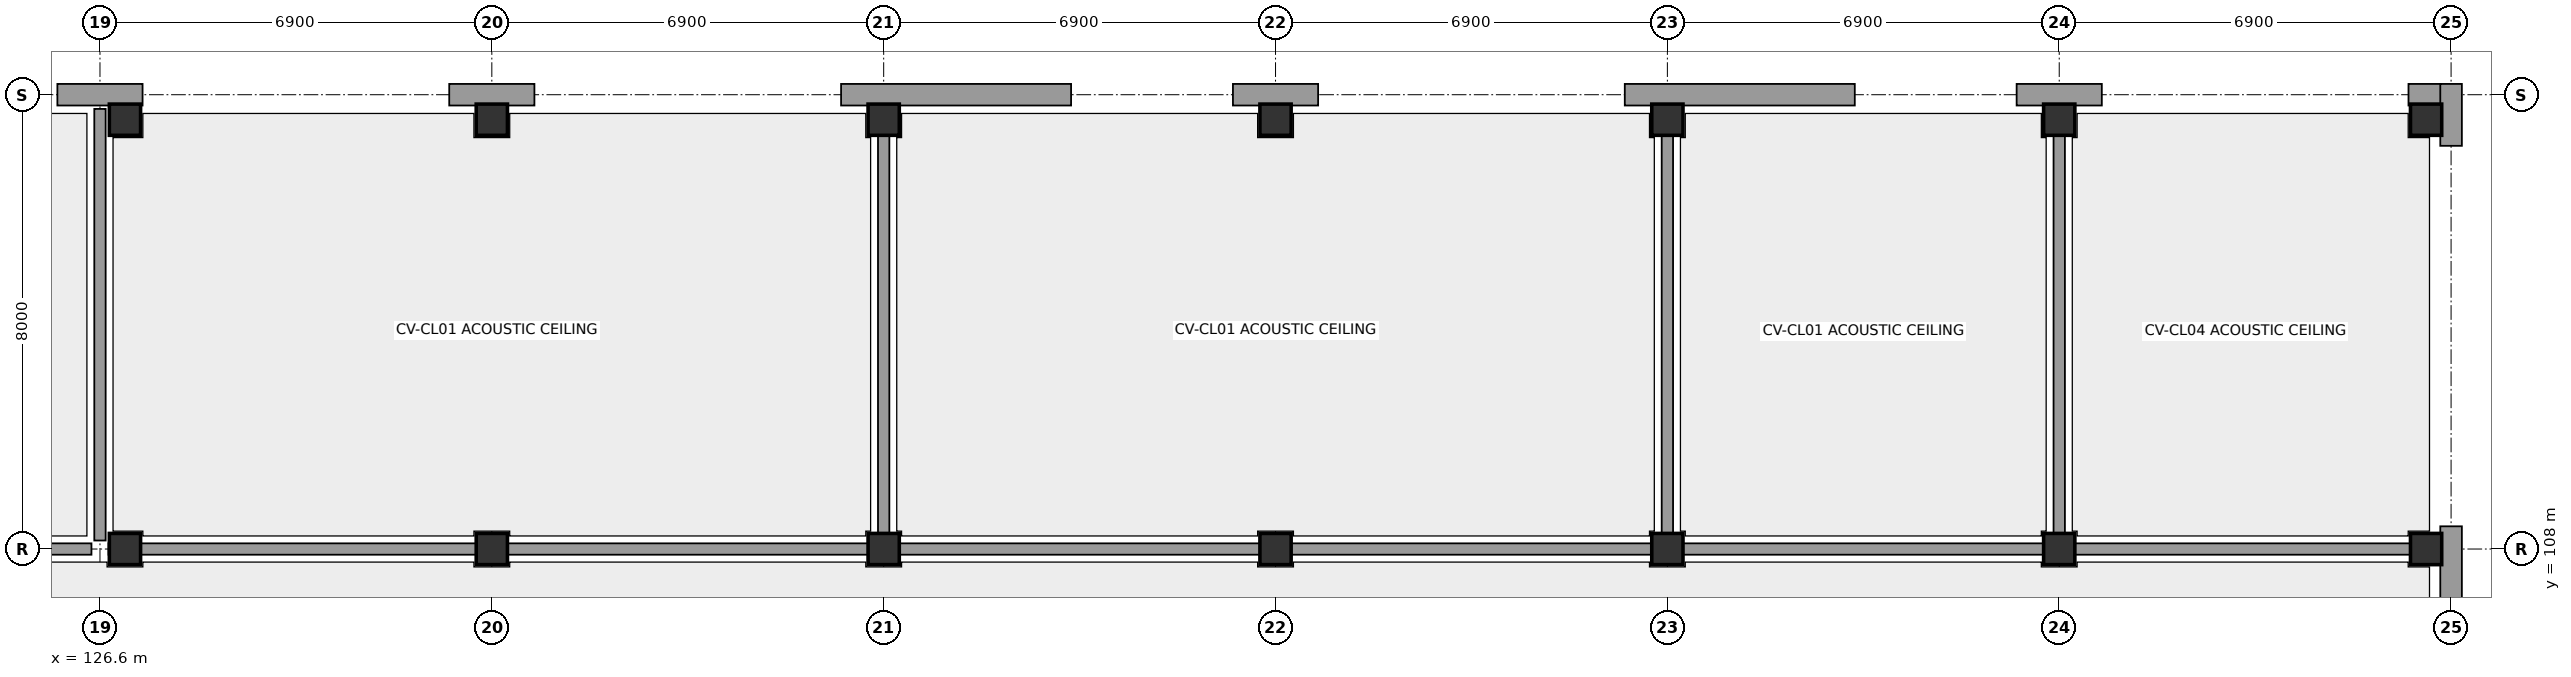
"""IFC4 building model, lengths in metres.
Left out: names, types, materials, properties, quantities, classifications, styles, units other than length and angle.
Written with IfcOpenShell. Run it as: python <this file> out.ifc"""

import sys

from ifc_helpers import new_model, si_unit, direction, frame, frame_2d, origin, origin_with_axes, origin_2d, place, context, subcontext, project, spatial, rectangle, extrude, element, fill, save


model = new_model("IFC4")
c1 = context("Model", 3, precision=1e-05, world=origin(), true_north=direction((0.0, 1.0)))
c2 = subcontext(c1, "Body", "Model", "MODEL_VIEW")
j1 = project(units=[si_unit("LENGTHUNIT", "METRE"), si_unit("PLANEANGLEUNIT", "RADIAN")], contexts=[c1])
p1 = place(None, origin())
s1 = spatial("IfcSite", under=j1, at=p1, CompositionType="ELEMENT")
p2 = place(p1, origin())
s2 = spatial("IfcBuilding", under=s1, at=p2, CompositionType="ELEMENT")
p3 = place(p2, origin())
s3 = spatial("IfcBuildingStorey", under=s2, at=p3, CompositionType="ELEMENT", Elevation=0.0)
for number, where, z_axis, x_axis in (
    (1, (127.04, 108.0, 0.0), (0.0, 0.0, 1.0), (1.0, 0.0, 0.0)),
    (2, (127.04, 115.56, 0.0), (0.0, 0.0, 1.0), (1.0, 0.0, 0.0)),
    (3, (133.5, 108.0, 0.0), (0.0, 0.0, 1.0), (1.0, 0.0, 0.0)),
    (4, (133.5, 115.56, 0.0), (0.0, 0.0, 1.0), (1.0, 0.0, 0.0)),
    (5, (140.4, 108.0, 0.0), (0.0, 0.0, 1.0), (1.0, 0.0, 0.0)),
    (6, (140.4, 115.56, 0.0), (0.0, 0.0, 1.0), (1.0, 0.0, 0.0)),
    (7, (147.3, 108.0, 0.0), (0.0, 0.0, 1.0), (1.0, 0.0, 0.0)),
    (8, (147.3, 115.56, 0.0), (0.0, 0.0, 1.0), (1.0, 0.0, 0.0)),
    (9, (154.2, 108.0, 0.0), (0.0, 0.0, 1.0), (1.0, 0.0, 0.0)),
    (10, (154.2, 115.56, 0.0), (0.0, 0.0, 1.0), (1.0, 0.0, 0.0)),
    (11, (161.1, 108.0, 0.0), (0.0, 0.0, 1.0), (1.0, 0.0, 0.0)),
    (12, (161.1, 115.56, 0.0), (0.0, 0.0, 1.0), (1.0, 0.0, 0.0)),
    (13, (167.56, 108.0, 0.0), (0.0, 0.0, 1.0), (1.0, 0.0, 0.0)),
    (14, (167.56, 115.56, 0.0), (0.0, 0.0, 1.0), (1.0, 0.0, 0.0)),
):
    element("IfcColumn", number, at=place(p3, frame(where, z_axis=z_axis, x_axis=x_axis)), inside=s3, PredefinedType="COLUMN", context=c2, shape_type="SweptSolid", body=[
        extrude(rectangle(XDim=0.55, YDim=0.55, at=origin_2d()), origin(), (0.0, 0.0, 1.0), 4.4),
    ])
for number, where, z_axis, x_axis in (
    (15, (125.85, 116.0, 0.0), (0.0, 0.0, 1.0), (1.0, 0.0, 0.0)),
    (16, (132.75, 116.0, 0.0), (0.0, 0.0, 1.0), (1.0, 0.0, 0.0)),
):
    element("IfcWall", number, at=place(p3, frame(where, z_axis=z_axis, x_axis=x_axis)), inside=s3, PredefinedType="STANDARD", context=c2, shape_type="SweptSolid", body=[
        extrude(rectangle(XDim=1.5, YDim=0.38, at=frame_2d((0.75, 0.0))), origin(), (0.0, 0.0, 1.0), 4.12),
    ])
p4 = place(p3, frame((139.65, 116.0, 0.0), z_axis=(0.0, 0.0, 1.0), x_axis=(1.0, 0.0, 0.0)))
e17 = element("IfcWall", 17, at=p4, inside=s3, PredefinedType="STANDARD", context=c2, shape_type="SweptSolid", body=[
    extrude(rectangle(XDim=4.05, YDim=0.38, at=frame_2d((2.025, 0.0))), origin(), (0.0, 0.0, 1.0), 4.12),
])
p5 = place(p4, frame((2.0, 0.0, 0.0)))
e18 = element("IfcOpeningElement", 18, at=p5, cuts=e17, PredefinedType="OPENING", context=c2, shape_type="SweptSolid", body=[
    extrude(rectangle(XDim=1.6, YDim=2.3, at=frame_2d((0.8, 1.15))), frame((0.0, 0.202, 0.0), z_axis=(0.0, -1.0, 0.0), x_axis=(1.0, 0.0, 0.0)), (0.0, 0.0, 1.0), 0.404),
])
p6 = place(p3, frame((146.55, 116.0, 0.0), z_axis=(0.0, 0.0, 1.0), x_axis=(1.0, 0.0, 0.0)))
e19 = element("IfcWall", 19, at=p6, inside=s3, PredefinedType="STANDARD", context=c2, shape_type="SweptSolid", body=[
    extrude(rectangle(XDim=1.5, YDim=0.38, at=frame_2d((0.75, 0.0))), origin(), (0.0, 0.0, 1.0), 4.12),
])
p7 = place(p3, frame((153.45, 116.0, 0.0), z_axis=(0.0, 0.0, 1.0), x_axis=(1.0, 0.0, 0.0)))
e20 = element("IfcWall", 20, at=p7, inside=s3, PredefinedType="STANDARD", context=c2, shape_type="SweptSolid", body=[
    extrude(rectangle(XDim=4.05, YDim=0.38, at=frame_2d((2.025, 0.0))), origin(), (0.0, 0.0, 1.0), 4.12),
])
p8 = place(p7, frame((2.0, 0.0, 0.0)))
e21 = element("IfcOpeningElement", 21, at=p8, cuts=e20, PredefinedType="OPENING", context=c2, shape_type="SweptSolid", body=[
    extrude(rectangle(XDim=1.6, YDim=2.3, at=frame_2d((0.8, 1.15))), frame((0.0, 0.202, 0.0), z_axis=(0.0, -1.0, 0.0), x_axis=(1.0, 0.0, 0.0)), (0.0, 0.0, 1.0), 0.404),
])
p9 = place(p3, frame((160.35, 116.0, 0.0), z_axis=(0.0, 0.0, 1.0), x_axis=(1.0, 0.0, 0.0)))
e22 = element("IfcWall", 22, at=p9, inside=s3, PredefinedType="STANDARD", context=c2, shape_type="SweptSolid", body=[
    extrude(rectangle(XDim=1.5, YDim=0.38, at=frame_2d((0.75, 0.0))), origin(), (0.0, 0.0, 1.0), 4.12),
])
p10 = place(p3, frame((167.25, 116.0, 0.0), z_axis=(0.0, 0.0, 1.0), x_axis=(1.0, 0.0, 0.0)))
e23 = element("IfcWall", 23, at=p10, inside=s3, PredefinedType="STANDARD", context=c2, shape_type="SweptSolid", body=[
    extrude(rectangle(XDim=0.57, YDim=0.38, at=frame_2d((0.285, 0.0))), origin(), (0.0, 0.0, 1.0), 4.12),
])
p11 = place(p3, frame((168.0, 105.2, 0.0), z_axis=(0.0, 0.0, 1.0), x_axis=(0.0, 1.0, 0.0)))
e24 = element("IfcWall", 24, at=p11, inside=s3, PredefinedType="STANDARD", context=c2, shape_type="SweptSolid", body=[
    extrude(rectangle(XDim=3.2, YDim=0.38, at=frame_2d((1.6, 0.0))), origin(), (0.0, 0.0, 1.0), 4.12),
])
p12 = place(p3, frame((168.0, 115.1, 0.0), z_axis=(0.0, 0.0, 1.0), x_axis=(0.0, 1.0, 0.0)))
e25 = element("IfcWall", 25, at=p12, inside=s3, PredefinedType="STANDARD", context=c2, shape_type="SweptSolid", body=[
    extrude(rectangle(XDim=1.09, YDim=0.38, at=frame_2d((0.545, 0.0))), origin(), (0.0, 0.0, 1.0), 4.12),
])
p13 = place(p3, frame((113.1, 108.0, 0.0), z_axis=(0.0, 0.0, 1.0), x_axis=(1.0, 0.0, 0.0)))
e26 = element("IfcWall", 26, at=p13, inside=s3, PredefinedType="PARTITIONING", context=c2, shape_type="SweptSolid", body=[
    extrude(rectangle(XDim=13.35, YDim=0.2, at=frame_2d((6.675, 0.0))), origin(), (0.0, 0.0, 1.0), 3.56),
])
p14 = place(p13, frame((2.0, 0.0, 0.0)))
e27 = element("IfcOpeningElement", 27, at=p14, cuts=e26, PredefinedType="OPENING", context=c2, shape_type="SweptSolid", body=[
    extrude(rectangle(XDim=1.0, YDim=2.15, at=frame_2d((0.5, 1.075))), frame((0.0, 0.112, 0.0), z_axis=(0.0, -1.0, 0.0), x_axis=(1.0, 0.0, 0.0)), (0.0, 0.0, 1.0), 0.224),
])
p15 = place(p3, frame((126.6, 108.15, 0.0), z_axis=(0.0, 0.0, 1.0), x_axis=(0.0, 1.0, 0.0)))
e28 = element("IfcWall", 28, at=p15, inside=s3, PredefinedType="PARTITIONING", context=c2, shape_type="SweptSolid", body=[
    extrude(rectangle(XDim=7.6, YDim=0.2, at=frame_2d((3.8, 0.0))), origin(), (0.0, 0.0, 1.0), 4.12),
])
p16 = place(p3, frame((126.75, 108.0, 0.0), z_axis=(0.0, 0.0, 1.0), x_axis=(1.0, 0.0, 0.0)))
e29 = element("IfcWall", 29, at=p16, inside=s3, PredefinedType="PARTITIONING", context=c2, shape_type="SweptSolid", body=[
    extrude(rectangle(XDim=13.5, YDim=0.2, at=frame_2d((6.75, 0.0))), origin(), (0.0, 0.0, 1.0), 3.56),
])
p17 = place(p16, frame((2.0, 0.0, 0.0)))
e30 = element("IfcOpeningElement", 30, at=p17, cuts=e29, PredefinedType="OPENING", context=c2, shape_type="SweptSolid", body=[
    extrude(rectangle(XDim=1.0, YDim=2.15, at=frame_2d((0.5, 1.075))), frame((0.0, 0.112, 0.0), z_axis=(0.0, -1.0, 0.0), x_axis=(1.0, 0.0, 0.0)), (0.0, 0.0, 1.0), 0.224),
])
p18 = place(p3, frame((140.4, 108.15, 0.0), z_axis=(0.0, 0.0, 1.0), x_axis=(0.0, 1.0, 0.0)))
e31 = element("IfcWall", 31, at=p18, inside=s3, PredefinedType="PARTITIONING", context=c2, shape_type="SweptSolid", body=[
    extrude(rectangle(XDim=7.6, YDim=0.2, at=frame_2d((3.8, 0.0))), origin(), (0.0, 0.0, 1.0), 4.12),
])
p19 = place(p3, frame((140.55, 108.0, 0.0), z_axis=(0.0, 0.0, 1.0), x_axis=(1.0, 0.0, 0.0)))
e32 = element("IfcWall", 32, at=p19, inside=s3, PredefinedType="PARTITIONING", context=c2, shape_type="SweptSolid", body=[
    extrude(rectangle(XDim=13.5, YDim=0.2, at=frame_2d((6.75, 0.0))), origin(), (0.0, 0.0, 1.0), 3.56),
])
p20 = place(p19, frame((2.0, 0.0, 0.0)))
e33 = element("IfcOpeningElement", 33, at=p20, cuts=e32, PredefinedType="OPENING", context=c2, shape_type="SweptSolid", body=[
    extrude(rectangle(XDim=1.0, YDim=2.15, at=frame_2d((0.5, 1.075))), frame((0.0, 0.112, 0.0), z_axis=(0.0, -1.0, 0.0), x_axis=(1.0, 0.0, 0.0)), (0.0, 0.0, 1.0), 0.224),
])
p21 = place(p3, frame((154.2, 108.15, 0.0), z_axis=(0.0, 0.0, 1.0), x_axis=(0.0, 1.0, 0.0)))
e34 = element("IfcWall", 34, at=p21, inside=s3, PredefinedType="PARTITIONING", context=c2, shape_type="SweptSolid", body=[
    extrude(rectangle(XDim=7.6, YDim=0.2, at=frame_2d((3.8, 0.0))), origin(), (0.0, 0.0, 1.0), 4.12),
])
p22 = place(p3, frame((154.35, 108.0, 0.0), z_axis=(0.0, 0.0, 1.0), x_axis=(1.0, 0.0, 0.0)))
e35 = element("IfcWall", 35, at=p22, inside=s3, PredefinedType="PARTITIONING", context=c2, shape_type="SweptSolid", body=[
    extrude(rectangle(XDim=6.6, YDim=0.2, at=frame_2d((3.3, 0.0))), origin(), (0.0, 0.0, 1.0), 3.56),
])
p23 = place(p22, frame((2.0, 0.0, 0.0)))
e36 = element("IfcOpeningElement", 36, at=p23, cuts=e35, PredefinedType="OPENING", context=c2, shape_type="SweptSolid", body=[
    extrude(rectangle(XDim=1.0, YDim=2.15, at=frame_2d((0.5, 1.075))), frame((0.0, 0.112, 0.0), z_axis=(0.0, -1.0, 0.0), x_axis=(1.0, 0.0, 0.0)), (0.0, 0.0, 1.0), 0.224),
])
p24 = place(p3, frame((161.1, 108.15, 0.0), z_axis=(0.0, 0.0, 1.0), x_axis=(0.0, 1.0, 0.0)))
e37 = element("IfcWall", 37, at=p24, inside=s3, PredefinedType="PARTITIONING", context=c2, shape_type="SweptSolid", body=[
    extrude(rectangle(XDim=7.6, YDim=0.2, at=frame_2d((3.8, 0.0))), origin(), (0.0, 0.0, 1.0), 3.56),
])
p25 = place(p3, frame((161.25, 108.0, 0.0), z_axis=(0.0, 0.0, 1.0), x_axis=(1.0, 0.0, 0.0)))
e38 = element("IfcWall", 38, at=p25, inside=s3, PredefinedType="PARTITIONING", context=c2, shape_type="SweptSolid", body=[
    extrude(rectangle(XDim=6.45, YDim=0.2, at=frame_2d((3.225, 0.0))), origin(), (0.0, 0.0, 1.0), 3.56),
])
p26 = place(p25, frame((2.0, 0.0, 0.0)))
e39 = element("IfcOpeningElement", 39, at=p26, cuts=e38, PredefinedType="OPENING", context=c2, shape_type="SweptSolid", body=[
    extrude(rectangle(XDim=1.0, YDim=2.15, at=frame_2d((0.5, 1.075))), frame((0.0, 0.112, 0.0), z_axis=(0.0, -1.0, 0.0), x_axis=(1.0, 0.0, 0.0)), (0.0, 0.0, 1.0), 0.224),
])
p27 = place(p5, origin_with_axes())
e40 = element("IfcDoor", 40, at=p27, inside=s3, OperationType="DOUBLE_DOOR_SINGLE_SWING", PredefinedType="DOOR", context=c2, shape_type="SweptSolid", body=[
    extrude(rectangle(XDim=1.6, YDim=2.3, at=frame_2d((0.8, 1.15))), frame((0.0, 0.025, 0.0), z_axis=(0.0, -1.0, 0.0), x_axis=(1.0, 0.0, 0.0)), (0.0, 0.0, 1.0), 0.05),
])
fill(e18, e40)
p28 = place(p8, origin_with_axes())
e41 = element("IfcDoor", 41, at=p28, inside=s3, OperationType="DOUBLE_DOOR_SINGLE_SWING", PredefinedType="DOOR", context=c2, shape_type="SweptSolid", body=[
    extrude(rectangle(XDim=1.6, YDim=2.3, at=frame_2d((0.8, 1.15))), frame((0.0, 0.025, 0.0), z_axis=(0.0, -1.0, 0.0), x_axis=(1.0, 0.0, 0.0)), (0.0, 0.0, 1.0), 0.05),
])
fill(e21, e41)
p29 = place(p17, origin_with_axes())
e42 = element("IfcDoor", 42, at=p29, inside=s3, OperationType="SINGLE_SWING_RIGHT", PredefinedType="DOOR", context=c2, shape_type="SweptSolid", body=[
    extrude(rectangle(XDim=1.0, YDim=2.15, at=frame_2d((0.5, 1.075))), frame((0.0, 0.025, 0.0), z_axis=(0.0, -1.0, 0.0), x_axis=(1.0, 0.0, 0.0)), (0.0, 0.0, 1.0), 0.05),
])
fill(e30, e42)
p30 = place(p20, frame((1.0, 0.0, 0.0), z_axis=(0.0, 0.0, 1.0), x_axis=(-1.0, 0.0, 0.0)))
e43 = element("IfcDoor", 43, at=p30, inside=s3, OperationType="SINGLE_SWING_LEFT", PredefinedType="DOOR", context=c2, shape_type="SweptSolid", body=[
    extrude(rectangle(XDim=1.0, YDim=2.15, at=frame_2d((0.5, 1.075))), frame((0.0, 0.025, 0.0), z_axis=(0.0, -1.0, 0.0), x_axis=(1.0, 0.0, 0.0)), (0.0, 0.0, 1.0), 0.05),
])
fill(e33, e43)
p31 = place(p23, origin_with_axes())
e44 = element("IfcDoor", 44, at=p31, inside=s3, OperationType="SINGLE_SWING_RIGHT", PredefinedType="DOOR", context=c2, shape_type="SweptSolid", body=[
    extrude(rectangle(XDim=1.0, YDim=2.15, at=frame_2d((0.5, 1.075))), frame((0.0, 0.025, 0.0), z_axis=(0.0, -1.0, 0.0), x_axis=(1.0, 0.0, 0.0)), (0.0, 0.0, 1.0), 0.05),
])
fill(e36, e44)
p32 = place(p26, frame((1.0, 0.0, 0.0), z_axis=(0.0, 0.0, 1.0), x_axis=(-1.0, 0.0, 0.0)))
e45 = element("IfcDoor", 45, at=p32, inside=s3, OperationType="SINGLE_SWING_LEFT", PredefinedType="DOOR", context=c2, shape_type="SweptSolid", body=[
    extrude(rectangle(XDim=1.0, YDim=2.15, at=frame_2d((0.5, 1.075))), frame((0.0, 0.025, 0.0), z_axis=(0.0, -1.0, 0.0), x_axis=(1.0, 0.0, 0.0)), (0.0, 0.0, 1.0), 0.05),
])
fill(e39, e45)
save(model, sys.argv[1])
